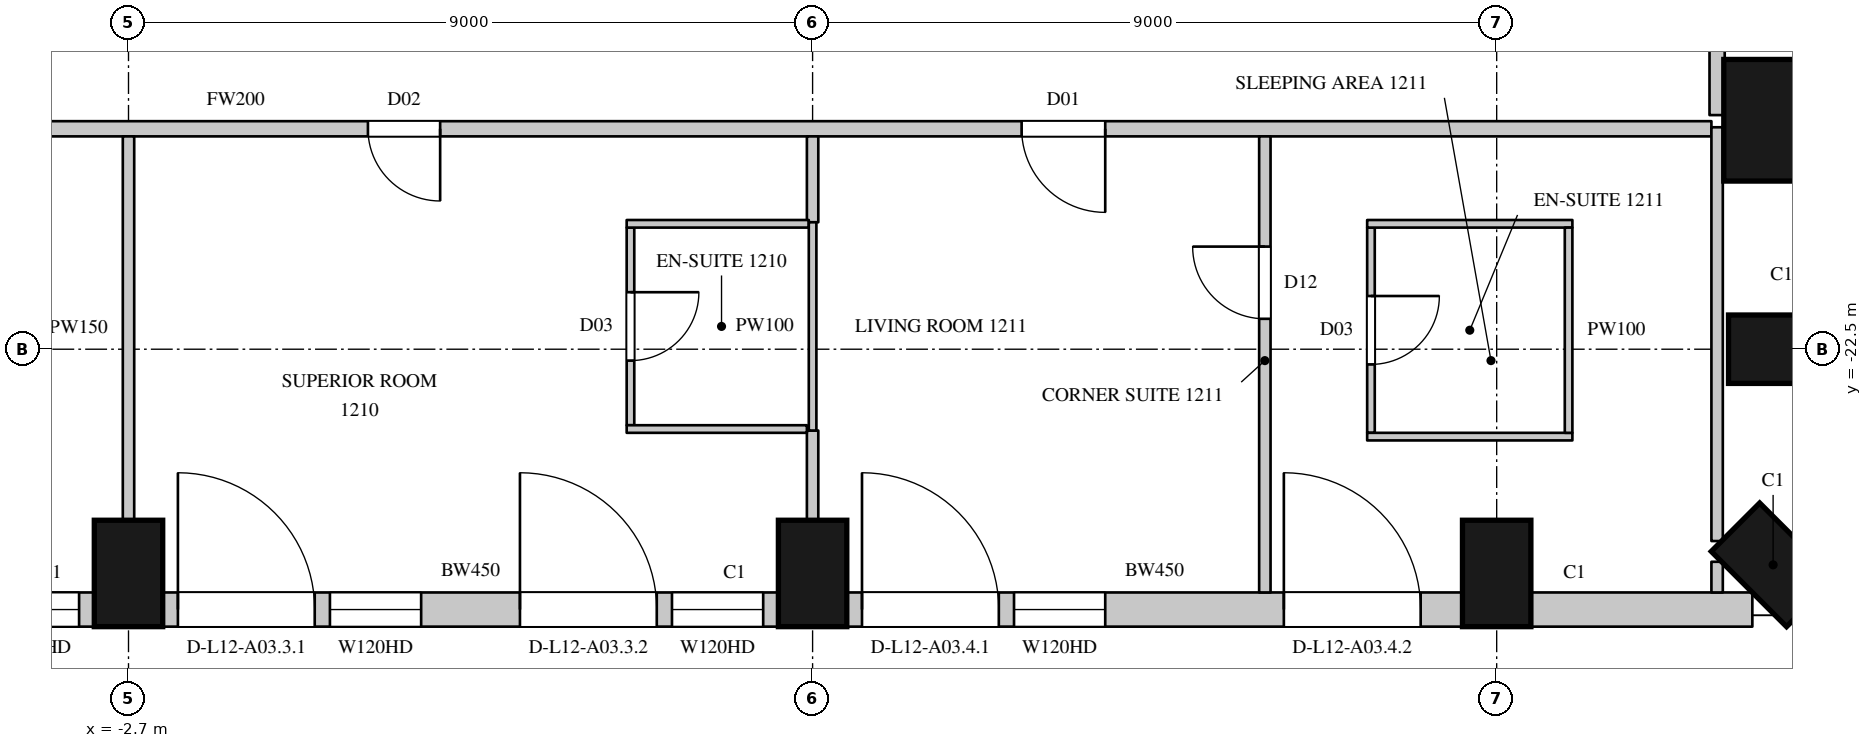
"""IFC4 building model, lengths in metres.
Left out: names, types, materials, properties, quantities, classifications, styles, units other than length and angle.
Written with IfcOpenShell. Run it as: python <this file> out.ifc"""

import sys

from ifc_helpers import new_model, si_unit, direction, frame, frame_2d, origin, origin_2d, place, context, subcontext, project, spatial, rectangle, circle, extrude, element, fill, save


model = new_model("IFC4")
c1 = context("Model", 3, precision=1e-05, world=origin(), true_north=direction((0.0, 1.0)))
c2 = subcontext(c1, "Body", "Model", "MODEL_VIEW")
j1 = project(units=[si_unit("LENGTHUNIT", "METRE"), si_unit("PLANEANGLEUNIT", "RADIAN")], contexts=[c1])
p1 = place(None, origin())
s1 = spatial("IfcSite", under=j1, at=p1, CompositionType="ELEMENT")
p2 = place(p1, origin())
s2 = spatial("IfcBuilding", under=s1, at=p2, CompositionType="ELEMENT")
p3 = place(p2, frame((0.0, 0.0, 73.5)))
s3 = spatial("IfcBuildingStorey", under=s2, at=p3, CompositionType="ELEMENT", Elevation=73.5)
for number, where, z_axis, x_axis in (
    (1, (-2.7, -25.45, 0.0), (0.0, 0.0, 1.0), (1.0, 0.0, 0.0)),
    (2, (6.3, -25.45, 0.0), (0.0, 0.0, 1.0), (1.0, 0.0, 0.0)),
    (3, (15.3, -25.45, 0.0), (0.0, 0.0, 1.0), (1.0, 0.0, 0.0)),
    (4, (18.937, -25.337, 0.0), (0.0, 0.0, 1.0), (0.707, 0.707, 0.0)),
    (5, (19.05, -22.5, 0.0), (0.0, 0.0, 1.0), (0.0, 1.0, 0.0)),
):
    element("IfcColumn", number, at=place(p3, frame(where, z_axis=z_axis, x_axis=x_axis)), inside=s3, PredefinedType="COLUMN", context=c2, shape_type="SweptSolid", body=[
        extrude(rectangle(XDim=0.9, YDim=1.4, at=origin_2d()), origin(), (0.0, 0.0, 1.0), 3.6),
    ])
p4 = place(p3, frame((19.088, -19.488, 0.0), z_axis=(0.0, 0.0, 1.0), x_axis=(1.0, 0.0, 0.0)))
e6 = element("IfcColumn", 6, at=p4, inside=s3, PredefinedType="COLUMN", context=c2, shape_type="SweptSolid", body=[
    extrude(circle(Radius=0.8, at=origin_2d()), origin(), (0.0, 0.0, 1.0), 3.6),
])
p5 = place(p3, frame((-11.25, -25.925, 0.0), z_axis=(0.0, 0.0, 1.0), x_axis=(1.0, 0.0, 0.0)))
e7 = element("IfcWall", 7, at=p5, inside=s3, PredefinedType="SOLIDWALL", context=c2, shape_type="SweptSolid", body=[
    extrude(rectangle(XDim=8.1, YDim=0.45, at=frame_2d((4.05, 0.0))), origin(), (0.0, 0.0, 1.0), 3.3),
])
p6 = place(p5, frame((0.2, 0.0, 0.0)))
e8 = element("IfcOpeningElement", 8, at=p6, cuts=e7, PredefinedType="OPENING", context=c2, shape_type="SweptSolid", body=[
    extrude(rectangle(XDim=1.8, YDim=2.4, at=frame_2d((0.9, 1.2))), frame((0.0, 0.235, 0.0), z_axis=(0.0, -1.0, 0.0), x_axis=(1.0, 0.0, 0.0)), (0.0, 0.0, 1.0), 0.47),
])
p7 = place(p5, frame((2.2, 0.0, 1.05)))
e9 = element("IfcOpeningElement", 9, at=p7, cuts=e7, PredefinedType="OPENING", context=c2, shape_type="SweptSolid", body=[
    extrude(rectangle(XDim=1.2, YDim=2.0, at=frame_2d((0.6, 1.0))), frame((0.0, 0.235, 0.0), z_axis=(0.0, -1.0, 0.0), x_axis=(1.0, 0.0, 0.0)), (0.0, 0.0, 1.0), 0.47),
])
p8 = place(p5, frame((4.7, 0.0, 0.0)))
e10 = element("IfcOpeningElement", 10, at=p8, cuts=e7, PredefinedType="OPENING", context=c2, shape_type="SweptSolid", body=[
    extrude(rectangle(XDim=1.8, YDim=2.4, at=frame_2d((0.9, 1.2))), frame((0.0, 0.235, 0.0), z_axis=(0.0, -1.0, 0.0), x_axis=(1.0, 0.0, 0.0)), (0.0, 0.0, 1.0), 0.47),
])
p9 = place(p5, frame((6.7, 0.0, 1.05)))
e11 = element("IfcOpeningElement", 11, at=p9, cuts=e7, PredefinedType="OPENING", context=c2, shape_type="SweptSolid", body=[
    extrude(rectangle(XDim=1.2, YDim=2.0, at=frame_2d((0.6, 1.0))), frame((0.0, 0.235, 0.0), z_axis=(0.0, -1.0, 0.0), x_axis=(1.0, 0.0, 0.0)), (0.0, 0.0, 1.0), 0.47),
])
p10 = place(p3, frame((-2.25, -25.925, 0.0), z_axis=(0.0, 0.0, 1.0), x_axis=(1.0, 0.0, 0.0)))
e12 = element("IfcWall", 12, at=p10, inside=s3, PredefinedType="SOLIDWALL", context=c2, shape_type="SweptSolid", body=[
    extrude(rectangle(XDim=8.1, YDim=0.45, at=frame_2d((4.05, 0.0))), origin(), (0.0, 0.0, 1.0), 3.3),
])
p11 = place(p10, frame((0.2, 0.0, 0.0)))
e13 = element("IfcOpeningElement", 13, at=p11, cuts=e12, PredefinedType="OPENING", context=c2, shape_type="SweptSolid", body=[
    extrude(rectangle(XDim=1.8, YDim=2.4, at=frame_2d((0.9, 1.2))), frame((0.0, 0.235, 0.0), z_axis=(0.0, -1.0, 0.0), x_axis=(1.0, 0.0, 0.0)), (0.0, 0.0, 1.0), 0.47),
])
p12 = place(p10, frame((2.2, 0.0, 1.05)))
e14 = element("IfcOpeningElement", 14, at=p12, cuts=e12, PredefinedType="OPENING", context=c2, shape_type="SweptSolid", body=[
    extrude(rectangle(XDim=1.2, YDim=2.0, at=frame_2d((0.6, 1.0))), frame((0.0, 0.235, 0.0), z_axis=(0.0, -1.0, 0.0), x_axis=(1.0, 0.0, 0.0)), (0.0, 0.0, 1.0), 0.47),
])
p13 = place(p10, frame((4.7, 0.0, 0.0)))
e15 = element("IfcOpeningElement", 15, at=p13, cuts=e12, PredefinedType="OPENING", context=c2, shape_type="SweptSolid", body=[
    extrude(rectangle(XDim=1.8, YDim=2.4, at=frame_2d((0.9, 1.2))), frame((0.0, 0.235, 0.0), z_axis=(0.0, -1.0, 0.0), x_axis=(1.0, 0.0, 0.0)), (0.0, 0.0, 1.0), 0.47),
])
p14 = place(p10, frame((6.7, 0.0, 1.05)))
e16 = element("IfcOpeningElement", 16, at=p14, cuts=e12, PredefinedType="OPENING", context=c2, shape_type="SweptSolid", body=[
    extrude(rectangle(XDim=1.2, YDim=2.0, at=frame_2d((0.6, 1.0))), frame((0.0, 0.235, 0.0), z_axis=(0.0, -1.0, 0.0), x_axis=(1.0, 0.0, 0.0)), (0.0, 0.0, 1.0), 0.47),
])
p15 = place(p3, frame((6.75, -25.925, 0.0), z_axis=(0.0, 0.0, 1.0), x_axis=(1.0, 0.0, 0.0)))
e17 = element("IfcWall", 17, at=p15, inside=s3, PredefinedType="SOLIDWALL", context=c2, shape_type="SweptSolid", body=[
    extrude(rectangle(XDim=8.1, YDim=0.45, at=frame_2d((4.05, 0.0))), origin(), (0.0, 0.0, 1.0), 3.3),
])
p16 = place(p15, frame((0.2, 0.0, 0.0)))
e18 = element("IfcOpeningElement", 18, at=p16, cuts=e17, PredefinedType="OPENING", context=c2, shape_type="SweptSolid", body=[
    extrude(rectangle(XDim=1.8, YDim=2.4, at=frame_2d((0.9, 1.2))), frame((0.0, 0.235, 0.0), z_axis=(0.0, -1.0, 0.0), x_axis=(1.0, 0.0, 0.0)), (0.0, 0.0, 1.0), 0.47),
])
p17 = place(p15, frame((2.2, 0.0, 1.05)))
e19 = element("IfcOpeningElement", 19, at=p17, cuts=e17, PredefinedType="OPENING", context=c2, shape_type="SweptSolid", body=[
    extrude(rectangle(XDim=1.2, YDim=2.0, at=frame_2d((0.6, 1.0))), frame((0.0, 0.235, 0.0), z_axis=(0.0, -1.0, 0.0), x_axis=(1.0, 0.0, 0.0)), (0.0, 0.0, 1.0), 0.47),
])
p18 = place(p15, frame((5.75, 0.0, 0.0)))
e20 = element("IfcOpeningElement", 20, at=p18, cuts=e17, PredefinedType="OPENING", context=c2, shape_type="SweptSolid", body=[
    extrude(rectangle(XDim=1.8, YDim=2.4, at=frame_2d((0.9, 1.2))), frame((0.0, 0.235, 0.0), z_axis=(0.0, -1.0, 0.0), x_axis=(1.0, 0.0, 0.0)), (0.0, 0.0, 1.0), 0.47),
])
p19 = place(p3, frame((15.75, -25.925, 0.0), z_axis=(0.0, 0.0, 1.0), x_axis=(1.0, 0.0, 0.0)))
e21 = element("IfcWall", 21, at=p19, inside=s3, PredefinedType="SOLIDWALL", context=c2, shape_type="SweptSolid", body=[
    extrude(rectangle(XDim=2.914, YDim=0.45, at=frame_2d((1.457, 0.0))), origin(), (0.0, 0.0, 1.0), 3.3),
])
p20 = place(p3, frame((-20.7, -19.6, 0.0), z_axis=(0.0, 0.0, 1.0), x_axis=(1.0, 0.0, 0.0)))
e22 = element("IfcWall", 22, at=p20, inside=s3, PredefinedType="PARTITIONING", context=c2, shape_type="SweptSolid", body=[
    extrude(rectangle(XDim=38.825, YDim=0.2, at=frame_2d((19.413, 0.0))), origin(), (0.0, 0.0, 1.0), 3.3),
])
p21 = place(p20, frame((3.15, 0.0, 0.0)))
e23 = element("IfcOpeningElement", 23, at=p21, cuts=e22, PredefinedType="OPENING", context=c2, shape_type="SweptSolid", body=[
    extrude(rectangle(XDim=0.95, YDim=2.2, at=frame_2d((0.475, 1.1))), frame((0.0, 0.11, 0.0), z_axis=(0.0, -1.0, 0.0), x_axis=(1.0, 0.0, 0.0)), (0.0, 0.0, 1.0), 0.22),
])
p22 = place(p20, frame((13.9, 0.0, 0.0)))
e24 = element("IfcOpeningElement", 24, at=p22, cuts=e22, PredefinedType="OPENING", context=c2, shape_type="SweptSolid", body=[
    extrude(rectangle(XDim=0.95, YDim=2.2, at=frame_2d((0.475, 1.1))), frame((0.0, 0.11, 0.0), z_axis=(0.0, -1.0, 0.0), x_axis=(1.0, 0.0, 0.0)), (0.0, 0.0, 1.0), 0.22),
])
p23 = place(p20, frame((21.15, 0.0, 0.0)))
e25 = element("IfcOpeningElement", 25, at=p23, cuts=e22, PredefinedType="OPENING", context=c2, shape_type="SweptSolid", body=[
    extrude(rectangle(XDim=0.95, YDim=2.2, at=frame_2d((0.475, 1.1))), frame((0.0, 0.11, 0.0), z_axis=(0.0, -1.0, 0.0), x_axis=(1.0, 0.0, 0.0)), (0.0, 0.0, 1.0), 0.22),
])
p24 = place(p20, frame((29.75, 0.0, 0.0)))
e26 = element("IfcOpeningElement", 26, at=p24, cuts=e22, PredefinedType="OPENING", context=c2, shape_type="SweptSolid", body=[
    extrude(rectangle(XDim=1.1, YDim=2.4, at=frame_2d((0.55, 1.2))), frame((0.0, 0.11, 0.0), z_axis=(0.0, -1.0, 0.0), x_axis=(1.0, 0.0, 0.0)), (0.0, 0.0, 1.0), 0.22),
])
p25 = place(p3, frame((18.2, -19.42, 0.0), z_axis=(0.0, 0.0, 1.0), x_axis=(0.0, 1.0, 0.0)))
e27 = element("IfcWall", 27, at=p25, inside=s3, PredefinedType="PARTITIONING", context=c2, shape_type="SweptSolid", body=[
    extrude(rectangle(XDim=14.67, YDim=0.2, at=frame_2d((7.335, 0.0))), origin(), (0.0, 0.0, 1.0), 3.3),
])
p26 = place(p25, frame((3.95, 0.0, 0.0)))
e28 = element("IfcOpeningElement", 28, at=p26, cuts=e27, PredefinedType="OPENING", context=c2, shape_type="SweptSolid", body=[
    extrude(rectangle(XDim=0.95, YDim=2.2, at=frame_2d((0.475, 1.1))), frame((0.0, 0.11, 0.0), z_axis=(0.0, -1.0, 0.0), x_axis=(1.0, 0.0, 0.0)), (0.0, 0.0, 1.0), 0.22),
])
p27 = place(p25, frame((13.35, 0.0, 0.0)))
e29 = element("IfcOpeningElement", 29, at=p27, cuts=e27, PredefinedType="OPENING", context=c2, shape_type="SweptSolid", body=[
    extrude(rectangle(XDim=0.95, YDim=2.2, at=frame_2d((0.475, 1.1))), frame((0.0, 0.11, 0.0), z_axis=(0.0, -1.0, 0.0), x_axis=(1.0, 0.0, 0.0)), (0.0, 0.0, 1.0), 0.22),
])
p28 = place(p3, frame((-2.7, -24.75, 0.0), z_axis=(0.0, 0.0, 1.0), x_axis=(0.0, 1.0, 0.0)))
e30 = element("IfcWall", 30, at=p28, inside=s3, PredefinedType="PARTITIONING", context=c2, shape_type="SweptSolid", body=[
    extrude(rectangle(XDim=5.05, YDim=0.15, at=frame_2d((2.525, 0.0))), origin(), (0.0, 0.0, 1.0), 2.75),
])
p29 = place(p3, frame((6.3, -24.75, 0.0), z_axis=(0.0, 0.0, 1.0), x_axis=(0.0, 1.0, 0.0)))
e31 = element("IfcWall", 31, at=p29, inside=s3, PredefinedType="PARTITIONING", context=c2, shape_type="SweptSolid", body=[
    extrude(rectangle(XDim=1.18, YDim=0.15, at=frame_2d((0.59, 0.0))), origin(), (0.0, 0.0, 1.0), 2.75),
])
p30 = place(p3, frame((6.3, -20.83, 0.0), z_axis=(0.0, 0.0, 1.0), x_axis=(0.0, 1.0, 0.0)))
e32 = element("IfcWall", 32, at=p30, inside=s3, PredefinedType="PARTITIONING", context=c2, shape_type="SweptSolid", body=[
    extrude(rectangle(XDim=1.13, YDim=0.15, at=frame_2d((0.565, 0.0))), origin(), (0.0, 0.0, 1.0), 2.75),
])
p31 = place(p3, frame((12.25, -25.7, 0.0), z_axis=(0.0, 0.0, 1.0), x_axis=(0.0, 1.0, 0.0)))
e33 = element("IfcWall", 33, at=p31, inside=s3, PredefinedType="PARTITIONING", context=c2, shape_type="SweptSolid", body=[
    extrude(rectangle(XDim=6.0, YDim=0.15, at=frame_2d((3.0, 0.0))), origin(), (0.0, 0.0, 1.0), 3.3),
])
p32 = place(p31, frame((3.6, 0.0, 0.0)))
e34 = element("IfcOpeningElement", 34, at=p32, cuts=e33, PredefinedType="OPENING", context=c2, shape_type="SweptSolid", body=[
    extrude(rectangle(XDim=0.95, YDim=2.2, at=frame_2d((0.475, 1.1))), frame((0.0, 0.085, 0.0), z_axis=(0.0, -1.0, 0.0), x_axis=(1.0, 0.0, 0.0)), (0.0, 0.0, 1.0), 0.17),
])
p33 = place(p3, frame((18.2, -25.7, 0.0), z_axis=(0.0, 0.0, 1.0), x_axis=(0.0, 1.0, 0.0)))
e35 = element("IfcWall", 35, at=p33, inside=s3, PredefinedType="PARTITIONING", context=c2, shape_type="SweptSolid", body=[
    extrude(rectangle(XDim=0.404, YDim=0.15, at=frame_2d((0.202, 0.0))), origin(), (0.0, 0.0, 1.0), 3.3),
])
p34 = place(p3, frame((18.2, -25.024, 0.0), z_axis=(0.0, 0.0, 1.0), x_axis=(0.0, 1.0, 0.0)))
e36 = element("IfcWall", 36, at=p34, inside=s3, PredefinedType="PARTITIONING", context=c2, shape_type="SweptSolid", body=[
    extrude(rectangle(XDim=5.444, YDim=0.15, at=frame_2d((2.722, 0.0))), origin(), (0.0, 0.0, 1.0), 3.3),
])
p35 = place(p3, frame((3.904, -23.5, 0.0), z_axis=(0.0, 0.0, 1.0), x_axis=(0.0, 1.0, 0.0)))
e37 = element("IfcWall", 37, at=p35, inside=s3, PredefinedType="PARTITIONING", context=c2, shape_type="SweptSolid", body=[
    extrude(rectangle(XDim=2.6, YDim=0.1, at=frame_2d((1.3, 0.0))), origin(), (0.0, 0.0, 1.0), 3.3),
])
p36 = place(p35, frame((0.85, 0.0, 0.0)))
e38 = element("IfcOpeningElement", 38, at=p36, cuts=e37, PredefinedType="OPENING", context=c2, shape_type="SweptSolid", body=[
    extrude(rectangle(XDim=0.9, YDim=2.2, at=frame_2d((0.45, 1.1))), frame((0.0, 0.06, 0.0), z_axis=(0.0, -1.0, 0.0), x_axis=(1.0, 0.0, 0.0)), (0.0, 0.0, 1.0), 0.12),
])
p37 = place(p3, frame((3.854, -23.55, 0.0), z_axis=(0.0, 0.0, 1.0), x_axis=(1.0, 0.0, 0.0)))
e39 = element("IfcWall", 39, at=p37, inside=s3, PredefinedType="PARTITIONING", context=c2, shape_type="SweptSolid", body=[
    extrude(rectangle(XDim=2.371, YDim=0.1, at=frame_2d((1.186, 0.0))), origin(), (0.0, 0.0, 1.0), 3.3),
])
p38 = place(p3, frame((3.854, -20.85, 0.0), z_axis=(0.0, 0.0, 1.0), x_axis=(1.0, 0.0, 0.0)))
e40 = element("IfcWall", 40, at=p38, inside=s3, PredefinedType="PARTITIONING", context=c2, shape_type="SweptSolid", body=[
    extrude(rectangle(XDim=2.396, YDim=0.1, at=frame_2d((1.198, 0.0))), origin(), (0.0, 0.0, 1.0), 3.3),
])
p39 = place(p3, frame((6.3, -23.57, 0.0), z_axis=(0.0, 0.0, 1.0), x_axis=(0.0, 1.0, 0.0)))
e41 = element("IfcWall", 41, at=p39, inside=s3, PredefinedType="PARTITIONING", context=c2, shape_type="SweptSolid", body=[
    extrude(rectangle(XDim=2.74, YDim=0.1, at=frame_2d((1.37, 0.0))), origin(), (0.0, 0.0, 1.0), 2.75),
])
p40 = place(p3, frame((13.646, -23.6, 0.0), z_axis=(0.0, 0.0, 1.0), x_axis=(0.0, 1.0, 0.0)))
e42 = element("IfcWall", 42, at=p40, inside=s3, PredefinedType="PARTITIONING", context=c2, shape_type="SweptSolid", body=[
    extrude(rectangle(XDim=2.7, YDim=0.1, at=frame_2d((1.35, 0.0))), origin(), (0.0, 0.0, 1.0), 3.3),
])
p41 = place(p40, frame((0.9, 0.0, 0.0)))
e43 = element("IfcOpeningElement", 43, at=p41, cuts=e42, PredefinedType="OPENING", context=c2, shape_type="SweptSolid", body=[
    extrude(rectangle(XDim=0.9, YDim=2.2, at=frame_2d((0.45, 1.1))), frame((0.0, 0.06, 0.0), z_axis=(0.0, -1.0, 0.0), x_axis=(1.0, 0.0, 0.0)), (0.0, 0.0, 1.0), 0.12),
])
for number, where, z_axis, x_axis in (
    (44, (13.596, -23.65, 0.0), (0.0, 0.0, 1.0), (1.0, 0.0, 0.0)),
    (45, (13.596, -20.85, 0.0), (0.0, 0.0, 1.0), (1.0, 0.0, 0.0)),
):
    element("IfcWall", number, at=place(p3, frame(where, z_axis=z_axis, x_axis=x_axis)), inside=s3, PredefinedType="PARTITIONING", context=c2, shape_type="SweptSolid", body=[
        extrude(rectangle(XDim=2.7, YDim=0.1, at=frame_2d((1.35, 0.0))), origin(), (0.0, 0.0, 1.0), 3.3),
    ])
p42 = place(p3, frame((16.246, -23.6, 0.0), z_axis=(0.0, 0.0, 1.0), x_axis=(0.0, 1.0, 0.0)))
e46 = element("IfcWall", 46, at=p42, inside=s3, PredefinedType="PARTITIONING", context=c2, shape_type="SweptSolid", body=[
    extrude(rectangle(XDim=2.7, YDim=0.1, at=frame_2d((1.35, 0.0))), origin(), (0.0, 0.0, 1.0), 3.3),
])
p43 = place(p9, origin())
e47 = element("IfcWindow", 47, at=p43, inside=s3, PartitioningType="SINGLE_PANEL", PredefinedType="WINDOW", context=c2, shape_type="SweptSolid", body=[
    extrude(rectangle(XDim=1.2, YDim=2.0, at=frame_2d((0.6, 1.0))), frame((0.0, 0.135, 0.0), z_axis=(0.0, -1.0, 0.0), x_axis=(1.0, 0.0, 0.0)), (0.0, 0.0, 1.0), 0.06),
])
fill(e11, e47)
p44 = place(p11, origin())
e48 = element("IfcDoor", 48, at=p44, inside=s3, OperationType="SLIDING_TO_LEFT", PredefinedType="DOOR", context=c2, shape_type="SweptSolid", body=[
    extrude(rectangle(XDim=1.8, YDim=2.4, at=frame_2d((0.9, 1.2))), frame((0.0, 0.13, 0.0), z_axis=(0.0, -1.0, 0.0), x_axis=(1.0, 0.0, 0.0)), (0.0, 0.0, 1.0), 0.05),
])
fill(e13, e48)
p45 = place(p12, origin())
e49 = element("IfcWindow", 49, at=p45, inside=s3, PartitioningType="SINGLE_PANEL", PredefinedType="WINDOW", context=c2, shape_type="SweptSolid", body=[
    extrude(rectangle(XDim=1.2, YDim=2.0, at=frame_2d((0.6, 1.0))), frame((0.0, 0.135, 0.0), z_axis=(0.0, -1.0, 0.0), x_axis=(1.0, 0.0, 0.0)), (0.0, 0.0, 1.0), 0.06),
])
fill(e14, e49)
p46 = place(p13, origin())
e50 = element("IfcDoor", 50, at=p46, inside=s3, OperationType="SLIDING_TO_LEFT", PredefinedType="DOOR", context=c2, shape_type="SweptSolid", body=[
    extrude(rectangle(XDim=1.8, YDim=2.4, at=frame_2d((0.9, 1.2))), frame((0.0, 0.13, 0.0), z_axis=(0.0, -1.0, 0.0), x_axis=(1.0, 0.0, 0.0)), (0.0, 0.0, 1.0), 0.05),
])
fill(e15, e50)
p47 = place(p14, origin())
e51 = element("IfcWindow", 51, at=p47, inside=s3, PartitioningType="SINGLE_PANEL", PredefinedType="WINDOW", context=c2, shape_type="SweptSolid", body=[
    extrude(rectangle(XDim=1.2, YDim=2.0, at=frame_2d((0.6, 1.0))), frame((0.0, 0.135, 0.0), z_axis=(0.0, -1.0, 0.0), x_axis=(1.0, 0.0, 0.0)), (0.0, 0.0, 1.0), 0.06),
])
fill(e16, e51)
p48 = place(p16, origin())
e52 = element("IfcDoor", 52, at=p48, inside=s3, OperationType="SLIDING_TO_LEFT", PredefinedType="DOOR", context=c2, shape_type="SweptSolid", body=[
    extrude(rectangle(XDim=1.8, YDim=2.4, at=frame_2d((0.9, 1.2))), frame((0.0, 0.13, 0.0), z_axis=(0.0, -1.0, 0.0), x_axis=(1.0, 0.0, 0.0)), (0.0, 0.0, 1.0), 0.05),
])
fill(e18, e52)
p49 = place(p17, origin())
e53 = element("IfcWindow", 53, at=p49, inside=s3, PartitioningType="SINGLE_PANEL", PredefinedType="WINDOW", context=c2, shape_type="SweptSolid", body=[
    extrude(rectangle(XDim=1.2, YDim=2.0, at=frame_2d((0.6, 1.0))), frame((0.0, 0.135, 0.0), z_axis=(0.0, -1.0, 0.0), x_axis=(1.0, 0.0, 0.0)), (0.0, 0.0, 1.0), 0.06),
])
fill(e19, e53)
p50 = place(p18, origin())
e54 = element("IfcDoor", 54, at=p50, inside=s3, OperationType="SLIDING_TO_LEFT", PredefinedType="DOOR", context=c2, shape_type="SweptSolid", body=[
    extrude(rectangle(XDim=1.8, YDim=2.4, at=frame_2d((0.9, 1.2))), frame((0.0, 0.13, 0.0), z_axis=(0.0, -1.0, 0.0), x_axis=(1.0, 0.0, 0.0)), (0.0, 0.0, 1.0), 0.05),
])
fill(e20, e54)
p51 = place(p23, origin())
e55 = element("IfcDoor", 55, at=p51, inside=s3, OperationType="SINGLE_SWING_LEFT", PredefinedType="DOOR", context=c2, shape_type="SweptSolid", body=[
    extrude(rectangle(XDim=0.95, YDim=2.2, at=frame_2d((0.475, 1.1))), frame((0.0, 0.025, 0.0), z_axis=(0.0, -1.0, 0.0), x_axis=(1.0, 0.0, 0.0)), (0.0, 0.0, 1.0), 0.05),
])
fill(e25, e55)
p52 = place(p36, origin())
e56 = element("IfcDoor", 56, at=p52, inside=s3, OperationType="SINGLE_SWING_LEFT", PredefinedType="DOOR", context=c2, shape_type="SweptSolid", body=[
    extrude(rectangle(XDim=0.9, YDim=2.2, at=frame_2d((0.45, 1.1))), frame((0.0, 0.025, 0.0), z_axis=(0.0, -1.0, 0.0), x_axis=(1.0, 0.0, 0.0)), (0.0, 0.0, 1.0), 0.05),
])
fill(e38, e56)
p53 = place(p24, origin())
e57 = element("IfcDoor", 57, at=p53, inside=s3, OperationType="SINGLE_SWING_LEFT", PredefinedType="DOOR", context=c2, shape_type="SweptSolid", body=[
    extrude(rectangle(XDim=1.1, YDim=2.4, at=frame_2d((0.55, 1.2))), frame((0.0, 0.025, 0.0), z_axis=(0.0, -1.0, 0.0), x_axis=(1.0, 0.0, 0.0)), (0.0, 0.0, 1.0), 0.05),
])
fill(e26, e57)
p54 = place(p32, origin())
e58 = element("IfcDoor", 58, at=p54, inside=s3, OperationType="SINGLE_SWING_RIGHT", PredefinedType="DOOR", context=c2, shape_type="SweptSolid", body=[
    extrude(rectangle(XDim=0.95, YDim=2.2, at=frame_2d((0.475, 1.1))), frame((0.0, 0.025, 0.0), z_axis=(0.0, -1.0, 0.0), x_axis=(1.0, 0.0, 0.0)), (0.0, 0.0, 1.0), 0.05),
])
fill(e34, e58)
p55 = place(p41, origin())
e59 = element("IfcDoor", 59, at=p55, inside=s3, OperationType="SINGLE_SWING_LEFT", PredefinedType="DOOR", context=c2, shape_type="SweptSolid", body=[
    extrude(rectangle(XDim=0.9, YDim=2.2, at=frame_2d((0.45, 1.1))), frame((0.0, 0.025, 0.0), z_axis=(0.0, -1.0, 0.0), x_axis=(1.0, 0.0, 0.0)), (0.0, 0.0, 1.0), 0.05),
])
fill(e43, e59)
save(model, sys.argv[1])
